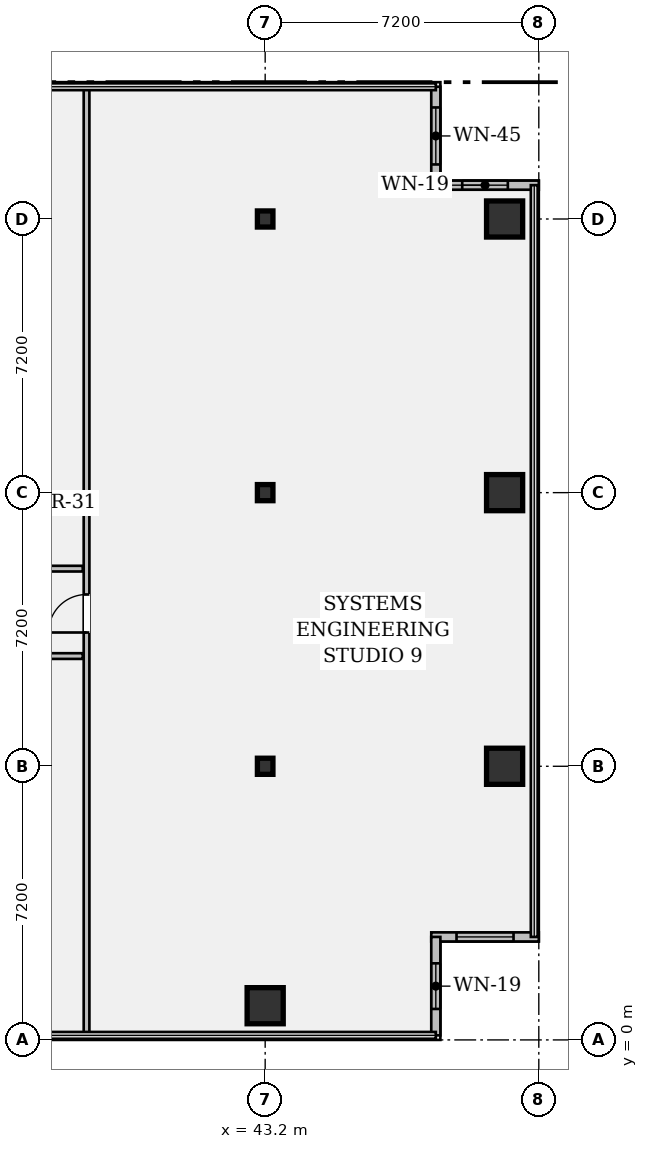
"""IFC4 building model, lengths in metres.
Left out: names, types, materials, properties, quantities, classifications, styles, units other than length and angle.
Written with IfcOpenShell. Run it as: python <this file> out.ifc"""

import sys

from ifc_helpers import new_model, si_unit, direction, frame, frame_2d, origin, origin_2d, place, context, subcontext, project, spatial, rectangle, hollow_rectangle, i_section, extrude, element, fill, save


model = new_model("IFC4")
c1 = context("Model", 3, precision=1e-05, world=origin(), true_north=direction((0.0, 1.0)))
c2 = subcontext(c1, "Body", "Model", "MODEL_VIEW")
j1 = project(units=[si_unit("LENGTHUNIT", "METRE"), si_unit("PLANEANGLEUNIT", "RADIAN")], contexts=[c1])
p1 = place(None, origin())
s1 = spatial("IfcSite", under=j1, at=p1, CompositionType="ELEMENT")
p2 = place(p1, origin())
s2 = spatial("IfcBuilding", under=s1, at=p2, CompositionType="ELEMENT")
p3 = place(p2, frame((0.0, 0.0, 88.9)))
s3 = spatial("IfcBuildingStorey", under=s2, at=p3, CompositionType="ELEMENT", Elevation=88.9)
p4 = place(p3, frame((43.2, 0.9, 0.0), z_axis=(0.0, 0.0, 1.0), x_axis=(1.0, 0.0, 0.0)))
e1 = element("IfcColumn", 1, at=p4, inside=s3, PredefinedType="COLUMN", context=c2, shape_type="SweptSolid", body=[
    extrude(hollow_rectangle(XDim=0.95, YDim=0.95, WallThickness=0.06, at=origin_2d()), origin(), (0.0, 0.0, 1.0), 3.57),
])
for number, where, z_axis, x_axis in (
    (2, (43.2, 7.2, 0.0), (0.0, 0.0, 1.0), (1.0, 0.0, 0.0)),
    (3, (43.2, 14.4, 0.0), (0.0, 0.0, 1.0), (1.0, 0.0, 0.0)),
    (4, (43.2, 21.6, 0.0), (0.0, 0.0, 1.0), (1.0, 0.0, 0.0)),
):
    element("IfcColumn", number, at=place(p3, frame(where, z_axis=z_axis, x_axis=x_axis)), inside=s3, PredefinedType="COLUMN", context=c2, shape_type="SweptSolid", body=[
        extrude(i_section(OverallWidth=0.409, OverallDepth=0.424, WebThickness=0.033, FlangeThickness=0.052, FilletRadius=0.018, at=origin_2d()), origin(), (0.0, 0.0, 1.0), 3.57),
    ])
for number, where, z_axis, x_axis in (
    (5, (49.5, 7.2, 0.0), (0.0, 0.0, 1.0), (1.0, 0.0, 0.0)),
    (6, (49.5, 14.4, 0.0), (0.0, 0.0, 1.0), (1.0, 0.0, 0.0)),
    (7, (49.5, 21.6, 0.0), (0.0, 0.0, 1.0), (1.0, 0.0, 0.0)),
):
    element("IfcColumn", number, at=place(p3, frame(where, z_axis=z_axis, x_axis=x_axis)), inside=s3, PredefinedType="COLUMN", context=c2, shape_type="SweptSolid", body=[
        extrude(hollow_rectangle(XDim=0.95, YDim=0.95, WallThickness=0.06, at=origin_2d()), origin(), (0.0, 0.0, 1.0), 3.57),
    ])
p5 = place(p3, frame((47.69, 25.08, 0.0), z_axis=(0.0, 0.0, 1.0), x_axis=(0.0, -1.0, 0.0)))
e8 = element("IfcWall", 8, at=p5, inside=s3, PredefinedType="STANDARD", context=c2, shape_type="SweptSolid", body=[
    extrude(rectangle(XDim=2.59, YDim=0.24, at=frame_2d((1.295, 0.0))), origin(), (0.0, 0.0, 1.0), 3.57),
])
p6 = place(p5, frame((0.545, 0.0, 0.95)))
e9 = element("IfcOpeningElement", 9, at=p6, cuts=e8, PredefinedType="OPENING", context=c2, shape_type="SweptSolid", body=[
    extrude(rectangle(XDim=1.5, YDim=1.8, at=frame_2d((0.75, 0.9))), frame((0.0, 0.132, 0.0), z_axis=(0.0, -1.0, 0.0), x_axis=(1.0, 0.0, 0.0)), (0.0, 0.0, 1.0), 0.264),
])
p7 = place(p3, frame((47.57, 22.49, 0.0), z_axis=(0.0, 0.0, 1.0), x_axis=(1.0, 0.0, 0.0)))
e10 = element("IfcWall", 10, at=p7, inside=s3, PredefinedType="STANDARD", context=c2, shape_type="SweptSolid", body=[
    extrude(rectangle(XDim=2.83, YDim=0.24, at=frame_2d((1.415, 0.0))), origin(), (0.0, 0.0, 1.0), 3.57),
])
p8 = place(p7, frame((0.815, 0.0, 0.95)))
e11 = element("IfcOpeningElement", 11, at=p8, cuts=e10, PredefinedType="OPENING", context=c2, shape_type="SweptSolid", body=[
    extrude(rectangle(XDim=1.2, YDim=1.8, at=frame_2d((0.6, 0.9))), frame((0.0, 0.132, 0.0), z_axis=(0.0, -1.0, 0.0), x_axis=(1.0, 0.0, 0.0)), (0.0, 0.0, 1.0), 0.264),
])
p9 = place(p3, frame((50.4, 2.71, 0.0), z_axis=(0.0, 0.0, 1.0), x_axis=(-1.0, 0.0, 0.0)))
e12 = element("IfcWall", 12, at=p9, inside=s3, PredefinedType="STANDARD", context=c2, shape_type="SweptSolid", body=[
    extrude(rectangle(XDim=2.83, YDim=0.24, at=frame_2d((1.415, 0.0))), origin(), (0.0, 0.0, 1.0), 3.57),
])
p10 = place(p9, frame((0.665, 0.0, 0.95)))
e13 = element("IfcOpeningElement", 13, at=p10, cuts=e12, PredefinedType="OPENING", context=c2, shape_type="SweptSolid", body=[
    extrude(rectangle(XDim=1.5, YDim=1.8, at=frame_2d((0.75, 0.9))), frame((0.0, 0.132, 0.0), z_axis=(0.0, -1.0, 0.0), x_axis=(1.0, 0.0, 0.0)), (0.0, 0.0, 1.0), 0.264),
])
p11 = place(p3, frame((47.69, 2.71, 0.0), z_axis=(0.0, 0.0, 1.0), x_axis=(0.0, -1.0, 0.0)))
e14 = element("IfcWall", 14, at=p11, inside=s3, PredefinedType="STANDARD", context=c2, shape_type="SweptSolid", body=[
    extrude(rectangle(XDim=2.59, YDim=0.24, at=frame_2d((1.295, 0.0))), origin(), (0.0, 0.0, 1.0), 3.57),
])
p12 = place(p11, frame((0.695, 0.0, 0.95)))
e15 = element("IfcOpeningElement", 15, at=p12, cuts=e14, PredefinedType="OPENING", context=c2, shape_type="SweptSolid", body=[
    extrude(rectangle(XDim=1.2, YDim=1.8, at=frame_2d((0.6, 0.9))), frame((0.0, 0.132, 0.0), z_axis=(0.0, -1.0, 0.0), x_axis=(1.0, 0.0, 0.0)), (0.0, 0.0, 1.0), 0.264),
])
p13 = place(p3, frame((17.35, 10.1, 0.0), z_axis=(0.0, 0.0, 1.0), x_axis=(1.0, 0.0, 0.0)))
e16 = element("IfcWall", 16, at=p13, inside=s3, PredefinedType="PARTITIONING", context=c2, shape_type="SweptSolid", body=[
    extrude(rectangle(XDim=21.05, YDim=0.15, at=frame_2d((10.525, 0.0))), origin(), (0.0, 0.0, 1.0), 2.783),
])
p14 = place(p13, frame((3.12, 0.0, 0.0)))
e17 = element("IfcOpeningElement", 17, at=p14, cuts=e16, PredefinedType="OPENING", context=c2, shape_type="SweptSolid", body=[
    extrude(rectangle(XDim=0.95, YDim=2.15, at=frame_2d((0.475, 1.075))), frame((0.0, 0.087, 0.0), z_axis=(0.0, -1.0, 0.0), x_axis=(1.0, 0.0, 0.0)), (0.0, 0.0, 1.0), 0.174),
])
p15 = place(p13, frame((10.65, 0.0, 0.0)))
e18 = element("IfcOpeningElement", 18, at=p15, cuts=e16, PredefinedType="OPENING", context=c2, shape_type="SweptSolid", body=[
    extrude(rectangle(XDim=0.95, YDim=2.15, at=frame_2d((0.475, 1.075))), frame((0.0, 0.087, 0.0), z_axis=(0.0, -1.0, 0.0), x_axis=(1.0, 0.0, 0.0)), (0.0, 0.0, 1.0), 0.174),
])
p16 = place(p13, frame((17.55, 0.0, 0.0)))
e19 = element("IfcOpeningElement", 19, at=p16, cuts=e16, PredefinedType="OPENING", context=c2, shape_type="SweptSolid", body=[
    extrude(rectangle(XDim=0.95, YDim=2.15, at=frame_2d((0.475, 1.075))), frame((0.0, 0.087, 0.0), z_axis=(0.0, -1.0, 0.0), x_axis=(1.0, 0.0, 0.0)), (0.0, 0.0, 1.0), 0.174),
])
p17 = place(p3, frame((17.35, 12.4, 0.0), z_axis=(0.0, 0.0, 1.0), x_axis=(1.0, 0.0, 0.0)))
e20 = element("IfcWall", 20, at=p17, inside=s3, PredefinedType="PARTITIONING", context=c2, shape_type="SweptSolid", body=[
    extrude(rectangle(XDim=21.05, YDim=0.15, at=frame_2d((10.525, 0.0))), origin(), (0.0, 0.0, 1.0), 2.783),
])
p18 = place(p17, frame((0.7, 0.0, 0.0)))
e21 = element("IfcOpeningElement", 21, at=p18, cuts=e20, PredefinedType="OPENING", context=c2, shape_type="SweptSolid", body=[
    extrude(rectangle(XDim=0.85, YDim=2.15, at=frame_2d((0.425, 1.075))), frame((0.0, 0.087, 0.0), z_axis=(0.0, -1.0, 0.0), x_axis=(1.0, 0.0, 0.0)), (0.0, 0.0, 1.0), 0.174),
])
p19 = place(p17, frame((3.95, 0.0, 0.0)))
e22 = element("IfcOpeningElement", 22, at=p19, cuts=e20, PredefinedType="OPENING", context=c2, shape_type="SweptSolid", body=[
    extrude(rectangle(XDim=0.85, YDim=2.15, at=frame_2d((0.425, 1.075))), frame((0.0, 0.087, 0.0), z_axis=(0.0, -1.0, 0.0), x_axis=(1.0, 0.0, 0.0)), (0.0, 0.0, 1.0), 0.174),
])
p20 = place(p17, frame((6.46, 0.0, 0.0)))
e23 = element("IfcOpeningElement", 23, at=p20, cuts=e20, PredefinedType="OPENING", context=c2, shape_type="SweptSolid", body=[
    extrude(rectangle(XDim=0.85, YDim=2.15, at=frame_2d((0.425, 1.075))), frame((0.0, 0.087, 0.0), z_axis=(0.0, -1.0, 0.0), x_axis=(1.0, 0.0, 0.0)), (0.0, 0.0, 1.0), 0.174),
])
p21 = place(p17, frame((9.5, 0.0, 0.0)))
e24 = element("IfcOpeningElement", 24, at=p21, cuts=e20, PredefinedType="OPENING", context=c2, shape_type="SweptSolid", body=[
    extrude(rectangle(XDim=0.95, YDim=2.15, at=frame_2d((0.475, 1.075))), frame((0.0, 0.087, 0.0), z_axis=(0.0, -1.0, 0.0), x_axis=(1.0, 0.0, 0.0)), (0.0, 0.0, 1.0), 0.174),
])
p22 = place(p3, frame((38.5, 0.12, 0.0), z_axis=(0.0, 0.0, 1.0), x_axis=(0.0, 1.0, 0.0)))
e25 = element("IfcWall", 25, at=p22, inside=s3, PredefinedType="PARTITIONING", context=c2, shape_type="SweptSolid", body=[
    extrude(rectangle(XDim=24.96, YDim=0.15, at=frame_2d((12.48, 0.0))), origin(), (0.0, 0.0, 1.0), 2.783),
])
p23 = place(p22, frame((10.6, 0.0, 0.0)))
e26 = element("IfcOpeningElement", 26, at=p23, cuts=e25, PredefinedType="OPENING", context=c2, shape_type="SweptSolid", body=[
    extrude(rectangle(XDim=1.0, YDim=2.15, at=frame_2d((0.5, 1.075))), frame((0.0, 0.087, 0.0), z_axis=(0.0, -1.0, 0.0), x_axis=(1.0, 0.0, 0.0)), (0.0, 0.0, 1.0), 0.174),
])
p24 = place(p6, origin())
e27 = element("IfcWindow", 27, at=p24, inside=s3, PartitioningType="SINGLE_PANEL", PredefinedType="WINDOW", context=c2, shape_type="SweptSolid", body=[
    extrude(rectangle(XDim=1.5, YDim=1.8, at=frame_2d((0.75, 0.9))), frame((0.0, 0.03, 0.0), z_axis=(0.0, -1.0, 0.0), x_axis=(1.0, 0.0, 0.0)), (0.0, 0.0, 1.0), 0.06),
])
fill(e9, e27)
p25 = place(p8, origin())
e28 = element("IfcWindow", 28, at=p25, inside=s3, PartitioningType="SINGLE_PANEL", PredefinedType="WINDOW", context=c2, shape_type="SweptSolid", body=[
    extrude(rectangle(XDim=1.2, YDim=1.8, at=frame_2d((0.6, 0.9))), frame((0.0, 0.03, 0.0), z_axis=(0.0, -1.0, 0.0), x_axis=(1.0, 0.0, 0.0)), (0.0, 0.0, 1.0), 0.06),
])
fill(e11, e28)
p26 = place(p10, origin())
e29 = element("IfcWindow", 29, at=p26, inside=s3, PartitioningType="SINGLE_PANEL", PredefinedType="WINDOW", context=c2, shape_type="SweptSolid", body=[
    extrude(rectangle(XDim=1.5, YDim=1.8, at=frame_2d((0.75, 0.9))), frame((0.0, 0.03, 0.0), z_axis=(0.0, -1.0, 0.0), x_axis=(1.0, 0.0, 0.0)), (0.0, 0.0, 1.0), 0.06),
])
fill(e13, e29)
p27 = place(p12, origin())
e30 = element("IfcWindow", 30, at=p27, inside=s3, PartitioningType="SINGLE_PANEL", PredefinedType="WINDOW", context=c2, shape_type="SweptSolid", body=[
    extrude(rectangle(XDim=1.2, YDim=1.8, at=frame_2d((0.6, 0.9))), frame((0.0, 0.03, 0.0), z_axis=(0.0, -1.0, 0.0), x_axis=(1.0, 0.0, 0.0)), (0.0, 0.0, 1.0), 0.06),
])
fill(e15, e30)
p28 = place(p23, origin())
e31 = element("IfcDoor", 31, at=p28, inside=s3, OperationType="SINGLE_SWING_LEFT", PredefinedType="DOOR", context=c2, shape_type="SweptSolid", body=[
    extrude(rectangle(XDim=1.0, YDim=2.15, at=frame_2d((0.5, 1.075))), frame((0.0, 0.025, 0.0), z_axis=(0.0, -1.0, 0.0), x_axis=(1.0, 0.0, 0.0)), (0.0, 0.0, 1.0), 0.05),
])
fill(e26, e31)
save(model, sys.argv[1])
